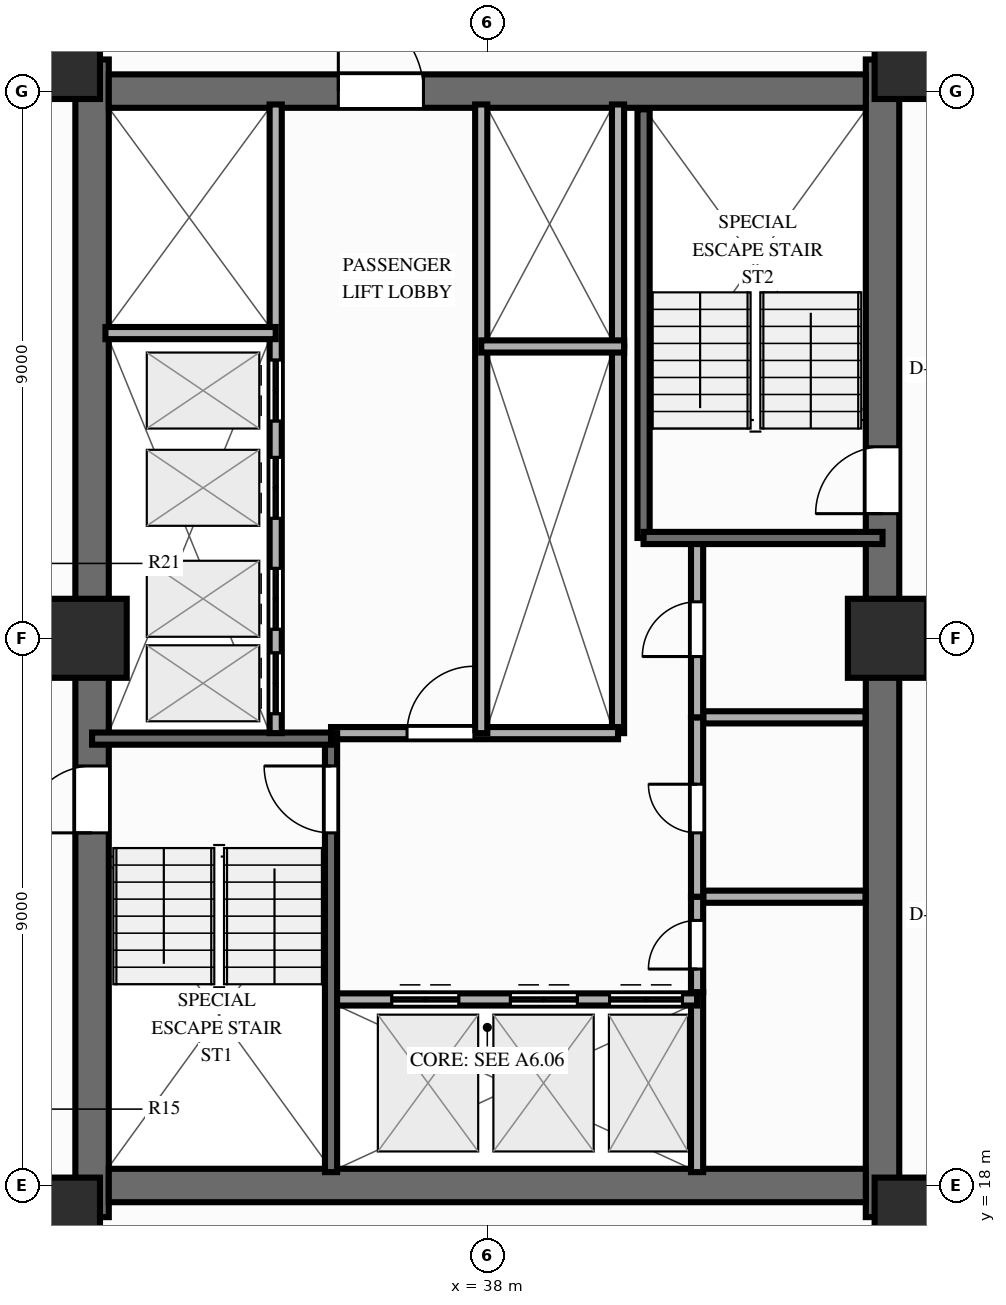
"""IFC4 building model, lengths in metres.
Left out: names, types, materials, properties, quantities, classifications, styles, units other than length and angle.
Written with IfcOpenShell. Run it as: python <this file> out.ifc"""

import sys

from ifc_helpers import new_model, si_unit, direction, frame, frame_2d, origin, origin_2d, place, context, subcontext, project, spatial, rectangle, extrude, source, transform, mapped, element, fill, save


model = new_model("IFC4")
c1 = context("Model", 3, precision=1e-05, world=origin(), true_north=direction((0.0, 1.0)))
c2 = subcontext(c1, "Body", "Model", "MODEL_VIEW")
j1 = project(units=[si_unit("LENGTHUNIT", "METRE"), si_unit("PLANEANGLEUNIT", "RADIAN")], contexts=[c1])
p1 = place(None, origin())
s1 = spatial("IfcSite", under=j1, at=p1, CompositionType="ELEMENT")
p2 = place(p1, origin())
s2 = spatial("IfcBuilding", under=s1, at=p2, CompositionType="ELEMENT")
p3 = place(p2, frame((0.0, 0.0, 83.85)))
s3 = spatial("IfcBuildingStorey", under=s2, at=p3, CompositionType="ELEMENT", Elevation=83.85)
p4 = place(p3, frame((31.5, 17.48, 0.0), z_axis=(0.0, 0.0, 1.0), x_axis=(0.0, 1.0, 0.0)))
e1 = element("IfcWall", 1, at=p4, inside=s3, PredefinedType="SHEAR", context=c2, shape_type="SweptSolid", body=[
    extrude(rectangle(XDim=19.04, YDim=0.55, at=frame_2d((9.52, 0.0))), origin(), (0.0, 0.0, 1.0), 3.0),
])
p5 = place(p4, frame((6.32, 0.0, 0.0)))
e2 = element("IfcOpeningElement", 2, at=p5, cuts=e1, PredefinedType="OPENING", context=c2, shape_type="SweptSolid", body=[
    extrude(rectangle(XDim=1.1, YDim=2.15, at=frame_2d((0.55, 1.075))), frame((0.0, 0.287, 0.0), z_axis=(0.0, -1.0, 0.0), x_axis=(1.0, 0.0, 0.0)), (0.0, 0.0, 1.0), 0.574),
])
p6 = place(p3, frame((44.5, 17.48, 0.0), z_axis=(0.0, 0.0, 1.0), x_axis=(0.0, 1.0, 0.0)))
e3 = element("IfcWall", 3, at=p6, inside=s3, PredefinedType="SHEAR", context=c2, shape_type="SweptSolid", body=[
    extrude(rectangle(XDim=19.04, YDim=0.55, at=frame_2d((9.52, 0.0))), origin(), (0.0, 0.0, 1.0), 3.0),
])
p7 = place(p6, frame((12.67, 0.0, 0.0), z_axis=(0.0, 0.0, 1.0), x_axis=(-1.0, 0.0, 0.0)))
e4 = element("IfcOpeningElement", 4, at=p7, cuts=e3, PredefinedType="OPENING", context=c2, shape_type="SweptSolid", body=[
    extrude(rectangle(XDim=1.1, YDim=2.15, at=frame_2d((0.55, 1.075))), frame((0.0, 0.287, 0.0), z_axis=(0.0, -1.0, 0.0), x_axis=(1.0, 0.0, 0.0)), (0.0, 0.0, 1.0), 0.574),
])
p8 = place(p3, frame((31.775, 18.0, 0.0), z_axis=(0.0, 0.0, 1.0), x_axis=(1.0, 0.0, 0.0)))
e5 = element("IfcWall", 5, at=p8, inside=s3, PredefinedType="SHEAR", context=c2, shape_type="SweptSolid", body=[
    extrude(rectangle(XDim=12.45, YDim=0.55, at=frame_2d((6.225, 0.0))), origin(), (0.0, 0.0, 1.0), 3.0),
])
p9 = place(p3, frame((31.775, 36.0, 0.0), z_axis=(0.0, 0.0, 1.0), x_axis=(1.0, 0.0, 0.0)))
e6 = element("IfcWall", 6, at=p9, inside=s3, PredefinedType="SHEAR", context=c2, shape_type="SweptSolid", body=[
    extrude(rectangle(XDim=12.45, YDim=0.55, at=frame_2d((6.225, 0.0))), origin(), (0.0, 0.0, 1.0), 3.0),
])
p10 = place(p9, frame((5.175, 0.0, 0.0), z_axis=(0.0, 0.0, 1.0), x_axis=(-1.0, 0.0, 0.0)))
e7 = element("IfcOpeningElement", 7, at=p10, cuts=e6, PredefinedType="OPENING", context=c2, shape_type="SweptSolid", body=[
    extrude(rectangle(XDim=1.4, YDim=2.15, at=frame_2d((0.7, 1.075))), frame((0.0, 0.287, 0.0), z_axis=(0.0, -1.0, 0.0), x_axis=(1.0, 0.0, 0.0)), (0.0, 0.0, 1.0), 0.574),
])
m1 = source(origin(), c2, "Body", "SweptSolid", [
    extrude(rectangle(XDim=1.3, YDim=1.3, at=origin_2d()), origin(), (0.0, 0.0, 1.0), 3.0),
])
for number, where, z_axis, x_axis in (
    (8, (30.98, 17.48, 0.0), (0.0, 0.0, 1.0), (1.0, 0.0, 0.0)),
    (9, (45.02, 17.48, 0.0), (0.0, 0.0, 1.0), (1.0, 0.0, 0.0)),
    (10, (30.98, 36.52, 0.0), (0.0, 0.0, 1.0), (1.0, 0.0, 0.0)),
    (11, (45.02, 36.52, 0.0), (0.0, 0.0, 1.0), (1.0, 0.0, 0.0)),
    (12, (31.42, 27.0, 0.0), (0.0, 0.0, 1.0), (1.0, 0.0, 0.0)),
    (13, (44.58, 27.0, 0.0), (0.0, 0.0, 1.0), (1.0, 0.0, 0.0)),
):
    element("IfcColumn", number, at=place(p3, frame(where, z_axis=z_axis, x_axis=x_axis)), inside=s3, PredefinedType="COLUMN", context=c2, shape_type="MappedRepresentation", body=[
        mapped(m1, transform((0.0, 0.0, 0.0), scale=1.0)),
    ])
p11 = place(p3, frame((41.55, 22.75, 0.0), z_axis=(0.0, 0.0, 1.0), x_axis=(1.0, 0.0, 0.0)))
e14 = element("IfcWall", 14, at=p11, inside=s3, PredefinedType="PARTITIONING", context=c2, shape_type="SweptSolid", body=[
    extrude(rectangle(XDim=2.67, YDim=0.2, at=frame_2d((1.335, 0.0))), origin(), (0.0, 0.0, 1.0), 2.79),
])
p12 = place(p3, frame((41.55, 25.7, 0.0), z_axis=(0.0, 0.0, 1.0), x_axis=(1.0, 0.0, 0.0)))
e15 = element("IfcWall", 15, at=p12, inside=s3, PredefinedType="PARTITIONING", context=c2, shape_type="SweptSolid", body=[
    extrude(rectangle(XDim=2.67, YDim=0.2, at=frame_2d((1.335, 0.0))), origin(), (0.0, 0.0, 1.0), 2.14),
])
p13 = place(p3, frame((41.45, 18.22, 0.0), z_axis=(0.0, 0.0, 1.0), x_axis=(0.0, 1.0, 0.0)))
e16 = element("IfcWall", 16, at=p13, inside=s3, PredefinedType="PARTITIONING", context=c2, shape_type="SweptSolid", body=[
    extrude(rectangle(XDim=2.96, YDim=0.2, at=frame_2d((1.48, 0.0))), origin(), (0.0, 0.0, 1.0), 2.79),
])
p14 = place(p3, frame((41.45, 21.18, 0.0), z_axis=(0.0, 0.0, 1.0), x_axis=(0.0, 1.0, 0.0)))
e17 = element("IfcWall", 17, at=p14, inside=s3, PredefinedType="PARTITIONING", context=c2, shape_type="SweptSolid", body=[
    extrude(rectangle(XDim=1.57, YDim=0.2, at=frame_2d((0.785, 0.0))), origin(), (0.0, 0.0, 1.0), 2.79),
])
p15 = place(p14, frame((0.38, 0.0, 0.0)))
e18 = element("IfcOpeningElement", 18, at=p15, cuts=e17, PredefinedType="OPENING", context=c2, shape_type="SweptSolid", body=[
    extrude(rectangle(XDim=0.8, YDim=2.05, at=frame_2d((0.4, 1.025))), frame((0.0, 0.112, 0.0), z_axis=(0.0, -1.0, 0.0), x_axis=(1.0, 0.0, 0.0)), (0.0, 0.0, 1.0), 0.224),
])
p16 = place(p3, frame((41.45, 22.75, 0.0), z_axis=(0.0, 0.0, 1.0), x_axis=(0.0, 1.0, 0.0)))
e19 = element("IfcWall", 19, at=p16, inside=s3, PredefinedType="PARTITIONING", context=c2, shape_type="SweptSolid", body=[
    extrude(rectangle(XDim=2.95, YDim=0.2, at=frame_2d((1.475, 0.0))), origin(), (0.0, 0.0, 1.0), 2.79),
])
p17 = place(p16, frame((1.05, 0.0, 0.0)))
e20 = element("IfcOpeningElement", 20, at=p17, cuts=e19, PredefinedType="OPENING", context=c2, shape_type="SweptSolid", body=[
    extrude(rectangle(XDim=0.8, YDim=2.05, at=frame_2d((0.4, 1.025))), frame((0.0, 0.112, 0.0), z_axis=(0.0, -1.0, 0.0), x_axis=(1.0, 0.0, 0.0)), (0.0, 0.0, 1.0), 0.224),
])
p18 = place(p3, frame((41.45, 25.7, 0.0), z_axis=(0.0, 0.0, 1.0), x_axis=(0.0, 1.0, 0.0)))
e21 = element("IfcWall", 21, at=p18, inside=s3, PredefinedType="PARTITIONING", context=c2, shape_type="SweptSolid", body=[
    extrude(rectangle(XDim=2.9, YDim=0.2, at=frame_2d((1.45, 0.0))), origin(), (0.0, 0.0, 1.0), 2.79),
])
p19 = place(p18, frame((1.0, 0.0, 0.0)))
e22 = element("IfcOpeningElement", 22, at=p19, cuts=e21, PredefinedType="OPENING", context=c2, shape_type="SweptSolid", body=[
    extrude(rectangle(XDim=0.9, YDim=2.1, at=frame_2d((0.45, 1.05))), frame((0.0, 0.112, 0.0), z_axis=(0.0, -1.0, 0.0), x_axis=(1.0, 0.0, 0.0)), (0.0, 0.0, 1.0), 0.224),
])
p20 = place(p3, frame((40.15, 25.44, 0.0), z_axis=(0.0, 0.0, 1.0), x_axis=(0.0, 1.0, 0.0)))
e23 = element("IfcWall", 23, at=p20, inside=s3, PredefinedType="PARTITIONING", context=c2, shape_type="SweptSolid", body=[
    extrude(rectangle(XDim=6.36, YDim=0.2, at=frame_2d((3.18, 0.0))), origin(), (0.0, 0.0, 1.0), 2.79),
])
p21 = place(p3, frame((40.15, 31.8, 0.0), z_axis=(0.0, 0.0, 1.0), x_axis=(0.0, 1.0, 0.0)))
e24 = element("IfcWall", 24, at=p21, inside=s3, PredefinedType="PARTITIONING", context=c2, shape_type="SweptSolid", body=[
    extrude(rectangle(XDim=3.98, YDim=0.2, at=frame_2d((1.99, 0.0))), origin(), (0.0, 0.0, 1.0), 2.79),
])
p22 = place(p3, frame((35.43, 21.06, 0.0), z_axis=(0.0, 0.0, 1.0), x_axis=(1.0, 0.0, 0.0)))
e25 = element("IfcWall", 25, at=p22, inside=s3, PredefinedType="PARTITIONING", context=c2, shape_type="SweptSolid", body=[
    extrude(rectangle(XDim=6.02, YDim=0.2, at=frame_2d((3.01, 0.0))), origin(), (0.0, 0.0, 1.0), 2.79),
])
p23 = place(p22, frame((1.0, 0.0, 0.0)))
e26 = element("IfcOpeningElement", 26, at=p23, cuts=e25, PredefinedType="OPENING", context=c2, shape_type="SweptSolid", body=[
    extrude(rectangle(XDim=1.1, YDim=2.15, at=frame_2d((0.55, 1.075))), frame((0.0, 0.112, 0.0), z_axis=(0.0, -1.0, 0.0), x_axis=(1.0, 0.0, 0.0)), (0.0, 0.0, 1.0), 0.224),
])
p24 = place(p22, frame((2.95, 0.0, 0.0)))
e27 = element("IfcOpeningElement", 27, at=p24, cuts=e25, PredefinedType="OPENING", context=c2, shape_type="SweptSolid", body=[
    extrude(rectangle(XDim=1.1, YDim=2.15, at=frame_2d((0.55, 1.075))), frame((0.0, 0.112, 0.0), z_axis=(0.0, -1.0, 0.0), x_axis=(1.0, 0.0, 0.0)), (0.0, 0.0, 1.0), 0.224),
])
p25 = place(p22, frame((4.58, 0.0, 0.0)))
e28 = element("IfcOpeningElement", 28, at=p25, cuts=e25, PredefinedType="OPENING", context=c2, shape_type="SweptSolid", body=[
    extrude(rectangle(XDim=1.2, YDim=2.15, at=frame_2d((0.6, 1.075))), frame((0.0, 0.112, 0.0), z_axis=(0.0, -1.0, 0.0), x_axis=(1.0, 0.0, 0.0)), (0.0, 0.0, 1.0), 0.224),
])
p26 = place(p3, frame((35.43, 25.44, 0.0), z_axis=(0.0, 0.0, 1.0), x_axis=(1.0, 0.0, 0.0)))
e29 = element("IfcWall", 29, at=p26, inside=s3, PredefinedType="PARTITIONING", context=c2, shape_type="SweptSolid", body=[
    extrude(rectangle(XDim=4.72, YDim=0.2, at=frame_2d((2.36, 0.0))), origin(), (0.0, 0.0, 1.0), 2.79),
])
p27 = place(p26, frame((1.25, 0.0, 0.0)))
e30 = element("IfcOpeningElement", 30, at=p27, cuts=e29, PredefinedType="OPENING", context=c2, shape_type="SweptSolid", body=[
    extrude(rectangle(XDim=1.1, YDim=2.15, at=frame_2d((0.55, 1.075))), frame((0.0, 0.112, 0.0), z_axis=(0.0, -1.0, 0.0), x_axis=(1.0, 0.0, 0.0)), (0.0, 0.0, 1.0), 0.224),
])
p28 = place(p3, frame((35.43, 18.22, 0.0), z_axis=(0.0, 0.0, 1.0), x_axis=(0.0, 1.0, 0.0)))
e31 = element("IfcWall", 31, at=p28, inside=s3, PredefinedType="SOLIDWALL", context=c2, shape_type="SweptSolid", body=[
    extrude(rectangle(XDim=7.22, YDim=0.2, at=frame_2d((3.61, 0.0))), origin(), (0.0, 0.0, 1.0), 2.79),
])
p29 = place(p28, frame((6.68, 0.0, 0.0), z_axis=(0.0, 0.0, 1.0), x_axis=(-1.0, 0.0, 0.0)))
e32 = element("IfcOpeningElement", 32, at=p29, cuts=e31, PredefinedType="OPENING", context=c2, shape_type="SweptSolid", body=[
    extrude(rectangle(XDim=1.1, YDim=2.15, at=frame_2d((0.55, 1.075))), frame((0.0, 0.112, 0.0), z_axis=(0.0, -1.0, 0.0), x_axis=(1.0, 0.0, 0.0)), (0.0, 0.0, 1.0), 0.224),
])
p30 = place(p3, frame((31.5, 25.35, 0.0), z_axis=(0.0, 0.0, 1.0), x_axis=(1.0, 0.0, 0.0)))
e33 = element("IfcWall", 33, at=p30, inside=s3, PredefinedType="SOLIDWALL", context=c2, shape_type="SweptSolid", body=[
    extrude(rectangle(XDim=3.93, YDim=0.2, at=frame_2d((1.965, 0.0))), origin(), (0.0, 0.0, 1.0), 2.79),
])
p31 = place(p3, frame((40.57, 28.65, 0.0), z_axis=(0.0, 0.0, 1.0), x_axis=(0.0, 1.0, 0.0)))
e34 = element("IfcWall", 34, at=p31, inside=s3, PredefinedType="SOLIDWALL", context=c2, shape_type="SweptSolid", body=[
    extrude(rectangle(XDim=7.05, YDim=0.2, at=frame_2d((3.525, 0.0))), origin(), (0.0, 0.0, 1.0), 2.79),
])
p32 = place(p3, frame((40.57, 28.65, 0.0), z_axis=(0.0, 0.0, 1.0), x_axis=(1.0, 0.0, 0.0)))
e35 = element("IfcWall", 35, at=p32, inside=s3, PredefinedType="SOLIDWALL", context=c2, shape_type="SweptSolid", body=[
    extrude(rectangle(XDim=3.93, YDim=0.2, at=frame_2d((1.965, 0.0))), origin(), (0.0, 0.0, 1.0), 2.79),
])
p33 = place(p3, frame((34.52, 25.44, 0.0), z_axis=(0.0, 0.0, 1.0), x_axis=(0.0, 1.0, 0.0)))
e36 = element("IfcWall", 36, at=p33, inside=s3, PredefinedType="PARTITIONING", context=c2, shape_type="SweptSolid", body=[
    extrude(rectangle(XDim=10.34, YDim=0.2, at=frame_2d((5.17, 0.0))), origin(), (0.0, 0.0, 1.0), 2.79),
])
p34 = place(p33, frame((0.32, 0.0, 0.0)))
e37 = element("IfcOpeningElement", 37, at=p34, cuts=e36, PredefinedType="OPENING", context=c2, shape_type="SweptSolid", body=[
    extrude(rectangle(XDim=1.0, YDim=2.15, at=frame_2d((0.5, 1.075))), frame((0.0, 0.112, 0.0), z_axis=(0.0, -1.0, 0.0), x_axis=(1.0, 0.0, 0.0)), (0.0, 0.0, 1.0), 0.224),
])
p35 = place(p33, frame((1.71, 0.0, 0.0)))
e38 = element("IfcOpeningElement", 38, at=p35, cuts=e36, PredefinedType="OPENING", context=c2, shape_type="SweptSolid", body=[
    extrude(rectangle(XDim=1.0, YDim=2.15, at=frame_2d((0.5, 1.075))), frame((0.0, 0.112, 0.0), z_axis=(0.0, -1.0, 0.0), x_axis=(1.0, 0.0, 0.0)), (0.0, 0.0, 1.0), 0.224),
])
p36 = place(p33, frame((3.535, 0.0, 0.0)))
e39 = element("IfcOpeningElement", 39, at=p36, cuts=e36, PredefinedType="OPENING", context=c2, shape_type="SweptSolid", body=[
    extrude(rectangle(XDim=1.0, YDim=2.15, at=frame_2d((0.5, 1.075))), frame((0.0, 0.112, 0.0), z_axis=(0.0, -1.0, 0.0), x_axis=(1.0, 0.0, 0.0)), (0.0, 0.0, 1.0), 0.224),
])
p37 = place(p33, frame((5.135, 0.0, 0.0)))
e40 = element("IfcOpeningElement", 40, at=p37, cuts=e36, PredefinedType="OPENING", context=c2, shape_type="SweptSolid", body=[
    extrude(rectangle(XDim=1.0, YDim=2.15, at=frame_2d((0.5, 1.075))), frame((0.0, 0.112, 0.0), z_axis=(0.0, -1.0, 0.0), x_axis=(1.0, 0.0, 0.0)), (0.0, 0.0, 1.0), 0.224),
])
p38 = place(p3, frame((31.72, 32.02, 0.0), z_axis=(0.0, 0.0, 1.0), x_axis=(1.0, 0.0, 0.0)))
e41 = element("IfcWall", 41, at=p38, inside=s3, PredefinedType="PARTITIONING", context=c2, shape_type="SweptSolid", body=[
    extrude(rectangle(XDim=2.8, YDim=0.2, at=frame_2d((1.4, 0.0))), origin(), (0.0, 0.0, 1.0), 2.79),
])
p39 = place(p3, frame((37.9, 25.44, 0.0), z_axis=(0.0, 0.0, 1.0), x_axis=(0.0, 1.0, 0.0)))
e42 = element("IfcWall", 42, at=p39, inside=s3, PredefinedType="PARTITIONING", context=c2, shape_type="SweptSolid", body=[
    extrude(rectangle(XDim=10.34, YDim=0.2, at=frame_2d((5.17, 0.0))), origin(), (0.0, 0.0, 1.0), 2.79),
])
p40 = place(p3, frame((37.9, 31.8, 0.0), z_axis=(0.0, 0.0, 1.0), x_axis=(1.0, 0.0, 0.0)))
e43 = element("IfcWall", 43, at=p40, inside=s3, PredefinedType="PARTITIONING", context=c2, shape_type="SweptSolid", body=[
    extrude(rectangle(XDim=2.35, YDim=0.2, at=frame_2d((1.175, 0.0))), origin(), (0.0, 0.0, 1.0), 2.79),
])
m2 = source(origin(), c2, "Body", "SweptSolid", [
    extrude(rectangle(XDim=1.1, YDim=2.15, at=frame_2d((0.55, 1.075))), frame((0.0, 0.025, 0.0), z_axis=(0.0, -1.0, 0.0), x_axis=(1.0, 0.0, 0.0)), (0.0, 0.0, 1.0), 0.05),
])
p41 = place(p5, origin())
e44 = element("IfcDoor", 44, at=p41, inside=s3, OperationType="SINGLE_SWING_LEFT", PredefinedType="DOOR", context=c2, shape_type="MappedRepresentation", body=[
    mapped(m2, transform((0.0, 0.0, 0.0), scale=1.0)),
])
fill(e2, e44)
p42 = place(p7, origin())
e45 = element("IfcDoor", 45, at=p42, inside=s3, OperationType="SINGLE_SWING_RIGHT", PredefinedType="DOOR", context=c2, shape_type="MappedRepresentation", body=[
    mapped(m2, transform((0.0, 0.0, 0.0), scale=1.0)),
])
fill(e4, e45)
m3 = source(origin(), c2, "Body", "SweptSolid", [
    extrude(rectangle(XDim=1.4, YDim=2.15, at=frame_2d((0.7, 1.075))), frame((0.0, 0.025, 0.0), z_axis=(0.0, -1.0, 0.0), x_axis=(1.0, 0.0, 0.0)), (0.0, 0.0, 1.0), 0.05),
])
p43 = place(p10, origin())
e46 = element("IfcDoor", 46, at=p43, inside=s3, OperationType="SINGLE_SWING_RIGHT", PredefinedType="DOOR", context=c2, shape_type="MappedRepresentation", body=[
    mapped(m3, transform((0.0, 0.0, 0.0), scale=1.0)),
])
fill(e7, e46)
m4 = source(origin(), c2, "Body", "SweptSolid", [
    extrude(rectangle(XDim=0.8, YDim=2.05, at=frame_2d((0.4, 1.025))), frame((0.0, 0.025, 0.0), z_axis=(0.0, -1.0, 0.0), x_axis=(1.0, 0.0, 0.0)), (0.0, 0.0, 1.0), 0.05),
])
p44 = place(p15, origin())
e47 = element("IfcDoor", 47, at=p44, inside=s3, OperationType="SINGLE_SWING_LEFT", PredefinedType="DOOR", context=c2, shape_type="MappedRepresentation", body=[
    mapped(m4, transform((0.0, 0.0, 0.0), scale=1.0)),
])
fill(e18, e47)
p45 = place(p17, origin())
e48 = element("IfcDoor", 48, at=p45, inside=s3, OperationType="SINGLE_SWING_RIGHT", PredefinedType="DOOR", context=c2, shape_type="MappedRepresentation", body=[
    mapped(m4, transform((0.0, 0.0, 0.0), scale=1.0)),
])
fill(e20, e48)
m5 = source(origin(), c2, "Body", "SweptSolid", [
    extrude(rectangle(XDim=0.9, YDim=2.1, at=frame_2d((0.45, 1.05))), frame((0.0, 0.025, 0.0), z_axis=(0.0, -1.0, 0.0), x_axis=(1.0, 0.0, 0.0)), (0.0, 0.0, 1.0), 0.05),
])
p46 = place(p19, origin())
e49 = element("IfcDoor", 49, at=p46, inside=s3, OperationType="SINGLE_SWING_LEFT", PredefinedType="DOOR", context=c2, shape_type="MappedRepresentation", body=[
    mapped(m5, transform((0.0, 0.0, 0.0), scale=1.0)),
])
fill(e22, e49)
p47 = place(p23, origin())
e50 = element("IfcDoor", 50, at=p47, inside=s3, OperationType="DOUBLE_DOOR_SLIDING", PredefinedType="DOOR", context=c2, shape_type="MappedRepresentation", body=[
    mapped(m2, transform((0.0, 0.0, 0.0), scale=1.0)),
])
fill(e26, e50)
p48 = place(p24, origin())
e51 = element("IfcDoor", 51, at=p48, inside=s3, OperationType="DOUBLE_DOOR_SLIDING", PredefinedType="DOOR", context=c2, shape_type="MappedRepresentation", body=[
    mapped(m2, transform((0.0, 0.0, 0.0), scale=1.0)),
])
fill(e27, e51)
m6 = source(origin(), c2, "Body", "SweptSolid", [
    extrude(rectangle(XDim=1.2, YDim=2.15, at=frame_2d((0.6, 1.075))), frame((0.0, 0.025, 0.0), z_axis=(0.0, -1.0, 0.0), x_axis=(1.0, 0.0, 0.0)), (0.0, 0.0, 1.0), 0.05),
])
p49 = place(p25, origin())
e52 = element("IfcDoor", 52, at=p49, inside=s3, OperationType="DOUBLE_DOOR_SLIDING", PredefinedType="DOOR", context=c2, shape_type="MappedRepresentation", body=[
    mapped(m6, transform((0.0, 0.0, 0.0), scale=1.0)),
])
fill(e28, e52)
p50 = place(p27, origin())
e53 = element("IfcDoor", 53, at=p50, inside=s3, OperationType="SINGLE_SWING_RIGHT", PredefinedType="DOOR", context=c2, shape_type="MappedRepresentation", body=[
    mapped(m2, transform((0.0, 0.0, 0.0), scale=1.0)),
])
fill(e30, e53)
p51 = place(p29, origin())
e54 = element("IfcDoor", 54, at=p51, inside=s3, OperationType="SINGLE_SWING_LEFT", PredefinedType="DOOR", context=c2, shape_type="MappedRepresentation", body=[
    mapped(m2, transform((0.0, 0.0, 0.0), scale=1.0)),
])
fill(e32, e54)
m7 = source(origin(), c2, "Body", "SweptSolid", [
    extrude(rectangle(XDim=1.0, YDim=2.15, at=frame_2d((0.5, 1.075))), frame((0.0, 0.025, 0.0), z_axis=(0.0, -1.0, 0.0), x_axis=(1.0, 0.0, 0.0)), (0.0, 0.0, 1.0), 0.05),
])
p52 = place(p34, origin())
e55 = element("IfcDoor", 55, at=p52, inside=s3, OperationType="DOUBLE_DOOR_SLIDING", PredefinedType="DOOR", context=c2, shape_type="MappedRepresentation", body=[
    mapped(m7, transform((0.0, 0.0, 0.0), scale=1.0)),
])
fill(e37, e55)
p53 = place(p35, origin())
e56 = element("IfcDoor", 56, at=p53, inside=s3, OperationType="DOUBLE_DOOR_SLIDING", PredefinedType="DOOR", context=c2, shape_type="MappedRepresentation", body=[
    mapped(m7, transform((0.0, 0.0, 0.0), scale=1.0)),
])
fill(e38, e56)
p54 = place(p36, origin())
e57 = element("IfcDoor", 57, at=p54, inside=s3, OperationType="DOUBLE_DOOR_SLIDING", PredefinedType="DOOR", context=c2, shape_type="MappedRepresentation", body=[
    mapped(m7, transform((0.0, 0.0, 0.0), scale=1.0)),
])
fill(e39, e57)
p55 = place(p37, origin())
e58 = element("IfcDoor", 58, at=p55, inside=s3, OperationType="DOUBLE_DOOR_SLIDING", PredefinedType="DOOR", context=c2, shape_type="MappedRepresentation", body=[
    mapped(m7, transform((0.0, 0.0, 0.0), scale=1.0)),
])
fill(e40, e58)
save(model, sys.argv[1])
